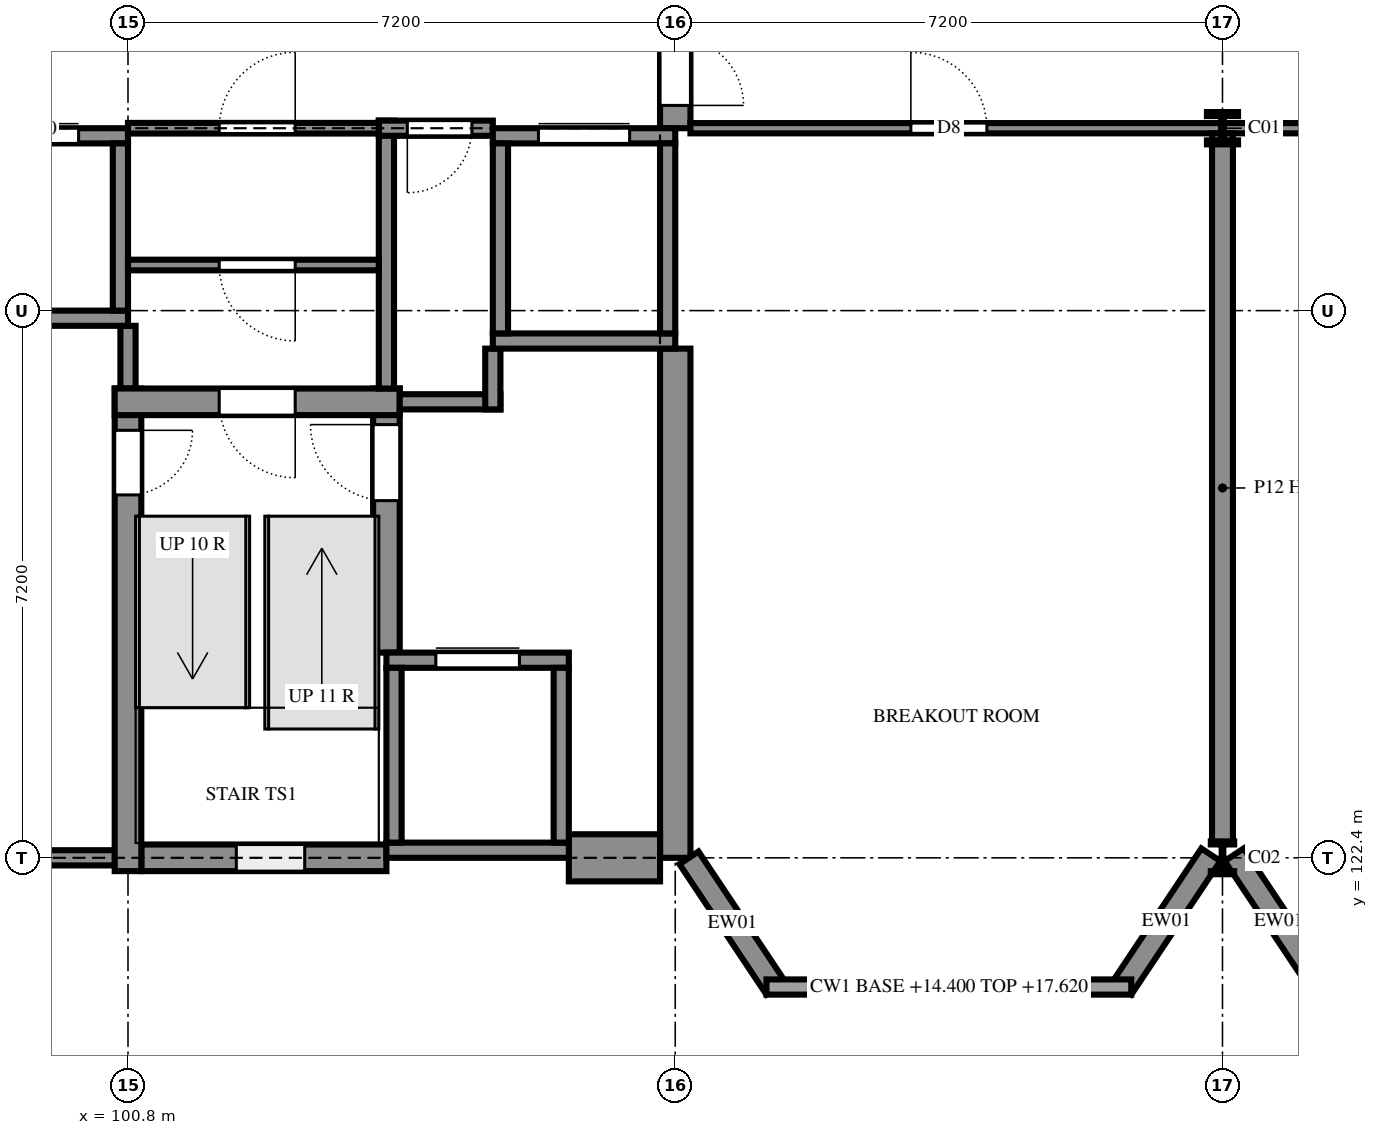
"""IFC4 building model, lengths in metres.
Left out: names, types, materials, properties, quantities, classifications, styles, units other than length and angle.
Written with IfcOpenShell. Run it as: python <this file> out.ifc"""

import sys

from ifc_helpers import new_model, si_unit, direction, frame, frame_2d, origin, origin_2d, place, context, subcontext, project, spatial, rectangle, i_section, extrude, element, fill, save


model = new_model("IFC4")
c1 = context("Model", 3, precision=1e-05, world=origin(), true_north=direction((0.0, 1.0)))
c2 = subcontext(c1, "Body", "Model", "MODEL_VIEW")
j1 = project(units=[si_unit("LENGTHUNIT", "METRE"), si_unit("PLANEANGLEUNIT", "RADIAN")], contexts=[c1])
p1 = place(None, origin())
s1 = spatial("IfcSite", under=j1, at=p1, CompositionType="ELEMENT")
p2 = place(p1, origin())
s2 = spatial("IfcBuilding", under=s1, at=p2, CompositionType="ELEMENT")
p3 = place(p2, frame((0.0, 0.0, 14.4)))
s3 = spatial("IfcBuildingStorey", under=s2, at=p3, CompositionType="ELEMENT", Elevation=14.4)
p4 = place(p3, frame((115.2, 122.4, 0.0), z_axis=(0.0, 0.0, 1.0), x_axis=(1.0, 0.0, 0.0)))
e1 = element("IfcColumn", 1, at=p4, inside=s3, PredefinedType="COLUMN", context=c2, shape_type="SweptSolid", body=[
    extrude(i_section(OverallWidth=0.307, OverallDepth=0.432, WebThickness=0.021, FlangeThickness=0.04, FilletRadius=0.027, at=origin_2d()), origin(), (0.0, 0.0, 1.0), 3.6),
])
p5 = place(p3, frame((115.2, 132.0, 0.0), z_axis=(0.0, 0.0, 1.0), x_axis=(1.0, 0.0, 0.0)))
e2 = element("IfcColumn", 2, at=p5, inside=s3, PredefinedType="COLUMN", context=c2, shape_type="SweptSolid", body=[
    extrude(i_section(OverallWidth=0.409, OverallDepth=0.425, WebThickness=0.033, FlangeThickness=0.052, FilletRadius=0.015, at=origin_2d()), origin(), (0.0, 0.0, 1.0), 3.6),
])
p6 = place(p3, frame((93.4, 122.4, 0.0), z_axis=(0.0, 0.0, 1.0), x_axis=(1.0, 0.0, 0.0)))
e3 = element("IfcWall", 3, at=p6, inside=s3, PredefinedType="SHEAR", context=c2, shape_type="SweptSolid", body=[
    extrude(rectangle(XDim=7.575, YDim=0.2, at=frame_2d((3.788, 0.0))), origin(), (0.0, 0.0, 1.0), 3.6),
])
p7 = place(p3, frame((100.975, 122.4, 0.0), z_axis=(0.0, 0.0, 1.0), x_axis=(1.0, 0.0, 0.0)))
e4 = element("IfcWall", 4, at=p7, inside=s3, PredefinedType="SHEAR", context=c2, shape_type="SweptSolid", body=[
    extrude(rectangle(XDim=3.225, YDim=0.35, at=frame_2d((1.612, 0.0))), origin(), (0.0, 0.0, 1.0), 3.6),
])
p8 = place(p7, frame((1.25, 0.0, 0.6)))
e5 = element("IfcOpeningElement", 5, at=p8, cuts=e4, PredefinedType="OPENING", context=c2, shape_type="SweptSolid", body=[
    extrude(rectangle(XDim=0.9, YDim=2.1, at=frame_2d((0.45, 1.05))), frame((0.0, 0.185, 0.0), z_axis=(0.0, -1.0, 0.0), x_axis=(1.0, 0.0, 0.0)), (0.0, 0.0, 1.0), 0.37),
])
p9 = place(p3, frame((108.0, 122.4, 0.0), z_axis=(0.0, 0.0, 1.0), x_axis=(0.0, 1.0, 0.0)))
e6 = element("IfcWall", 6, at=p9, inside=s3, PredefinedType="SHEAR", context=c2, shape_type="SweptSolid", body=[
    extrude(rectangle(XDim=6.7, YDim=0.4, at=frame_2d((3.35, 0.0))), origin(), (0.0, 0.0, 1.0), 3.6),
])
p10 = place(p3, frame((104.2, 125.1, 0.0), z_axis=(0.0, 0.0, 1.0), x_axis=(0.0, 1.0, 0.0)))
e7 = element("IfcWall", 7, at=p10, inside=s3, PredefinedType="SHEAR", context=c2, shape_type="SweptSolid", body=[
    extrude(rectangle(XDim=3.475, YDim=0.35, at=frame_2d((1.737, 0.0))), origin(), (0.0, 0.0, 1.0), 3.6),
])
p11 = place(p10, frame((2.0, 0.0, 0.0)))
e8 = element("IfcOpeningElement", 8, at=p11, cuts=e7, PredefinedType="OPENING", context=c2, shape_type="SweptSolid", body=[
    extrude(rectangle(XDim=1.0, YDim=2.1, at=frame_2d((0.5, 1.05))), frame((0.0, 0.185, 0.0), z_axis=(0.0, -1.0, 0.0), x_axis=(1.0, 0.0, 0.0)), (0.0, 0.0, 1.0), 0.37),
])
p12 = place(p3, frame((100.8, 128.575, 0.0), z_axis=(0.0, 0.0, 1.0), x_axis=(0.0, -1.0, 0.0)))
e9 = element("IfcWall", 9, at=p12, inside=s3, PredefinedType="SHEAR", context=c2, shape_type="SweptSolid", body=[
    extrude(rectangle(XDim=6.35, YDim=0.35, at=frame_2d((3.175, 0.0))), origin(), (0.0, 0.0, 1.0), 3.6),
])
p13 = place(p12, frame((0.55, 0.0, 0.0)))
e10 = element("IfcOpeningElement", 10, at=p13, cuts=e9, PredefinedType="OPENING", context=c2, shape_type="SweptSolid", body=[
    extrude(rectangle(XDim=0.85, YDim=2.1, at=frame_2d((0.425, 1.05))), frame((0.0, 0.185, 0.0), z_axis=(0.0, -1.0, 0.0), x_axis=(1.0, 0.0, 0.0)), (0.0, 0.0, 1.0), 0.37),
])
p14 = place(p3, frame((100.8, 128.575, 0.0), z_axis=(0.0, 0.0, 1.0), x_axis=(0.0, 1.0, 0.0)))
e11 = element("IfcWall", 11, at=p14, inside=s3, PredefinedType="SHEAR", context=c2, shape_type="SweptSolid", body=[
    extrude(rectangle(XDim=0.825, YDim=0.2, at=frame_2d((0.413, 0.0))), origin(), (0.0, 0.0, 1.0), 3.6),
])
p15 = place(p3, frame((104.375, 128.4, 0.0), z_axis=(0.0, 0.0, 1.0), x_axis=(-1.0, 0.0, 0.0)))
e12 = element("IfcWall", 12, at=p15, inside=s3, PredefinedType="SHEAR", context=c2, shape_type="SweptSolid", body=[
    extrude(rectangle(XDim=3.75, YDim=0.35, at=frame_2d((1.875, 0.0))), origin(), (0.0, 0.0, 1.0), 3.6),
])
p16 = place(p15, frame((1.375, 0.0, 0.0)))
e13 = element("IfcOpeningElement", 13, at=p16, cuts=e12, PredefinedType="OPENING", context=c2, shape_type="SweptSolid", body=[
    extrude(rectangle(XDim=1.0, YDim=2.1, at=frame_2d((0.5, 1.05))), frame((0.0, 0.185, 0.0), z_axis=(0.0, -1.0, 0.0), x_axis=(1.0, 0.0, 0.0)), (0.0, 0.0, 1.0), 0.37),
])
p17 = place(p3, frame((104.375, 128.4, 0.0), z_axis=(0.0, 0.0, 1.0), x_axis=(1.0, 0.0, 0.0)))
e14 = element("IfcWall", 14, at=p17, inside=s3, PredefinedType="SHEAR", context=c2, shape_type="SweptSolid", body=[
    extrude(rectangle(XDim=1.325, YDim=0.2, at=frame_2d((0.663, 0.0))), origin(), (0.0, 0.0, 1.0), 3.6),
])
p18 = place(p3, frame((105.6, 128.3, 0.0), z_axis=(0.0, 0.0, 1.0), x_axis=(0.0, 1.0, 0.0)))
e15 = element("IfcWall", 15, at=p18, inside=s3, PredefinedType="SHEAR", context=c2, shape_type="SweptSolid", body=[
    extrude(rectangle(XDim=0.8, YDim=0.2, at=frame_2d((0.4, 0.0))), origin(), (0.0, 0.0, 1.0), 3.6),
])
p19 = place(p3, frame((104.2, 132.1, 0.0), z_axis=(0.0, 0.0, 1.0), x_axis=(0.0, -1.0, 0.0)))
e16 = element("IfcWall", 16, at=p19, inside=s3, PredefinedType="SHEAR", context=c2, shape_type="SweptSolid", body=[
    extrude(rectangle(XDim=3.525, YDim=0.2, at=frame_2d((1.763, 0.0))), origin(), (0.0, 0.0, 1.0), 3.6),
])
p20 = place(p3, frame((105.6, 132.0, 0.0), z_axis=(0.0, 0.0, 1.0), x_axis=(-1.0, 0.0, 0.0)))
e17 = element("IfcWall", 17, at=p20, inside=s3, PredefinedType="SHEAR", context=c2, shape_type="SweptSolid", body=[
    extrude(rectangle(XDim=1.5, YDim=0.2, at=frame_2d((0.75, 0.0))), origin(), (0.0, 0.0, 1.0), 3.6),
])
p21 = place(p20, frame((0.275, 0.0, 0.0)))
e18 = element("IfcOpeningElement", 18, at=p21, cuts=e17, PredefinedType="OPENING", context=c2, shape_type="SweptSolid", body=[
    extrude(rectangle(XDim=0.85, YDim=2.1, at=frame_2d((0.425, 1.05))), frame((0.0, 0.11, 0.0), z_axis=(0.0, -1.0, 0.0), x_axis=(1.0, 0.0, 0.0)), (0.0, 0.0, 1.0), 0.22),
])
p22 = place(p3, frame((108.0, 132.0, 0.0), z_axis=(0.0, 0.0, 1.0), x_axis=(0.0, 1.0, 0.0)))
e19 = element("IfcWall", 19, at=p22, inside=s3, PredefinedType="SHEAR", context=c2, shape_type="SweptSolid", body=[
    extrude(rectangle(XDim=2.5, YDim=0.4, at=frame_2d((1.25, 0.0))), origin(), (0.0, 0.0, 1.0), 3.6),
])
p23 = place(p22, frame((0.3, 0.0, 0.0)))
e20 = element("IfcOpeningElement", 20, at=p23, cuts=e19, PredefinedType="OPENING", context=c2, shape_type="SweptSolid", body=[
    extrude(rectangle(XDim=1.8, YDim=2.1, at=frame_2d((0.9, 1.05))), frame((0.0, 0.21, 0.0), z_axis=(0.0, -1.0, 0.0), x_axis=(1.0, 0.0, 0.0)), (0.0, 0.0, 1.0), 0.42),
])
p24 = place(p3, frame((106.6, 122.4, 0.0), z_axis=(0.0, 0.0, 1.0), x_axis=(1.0, 0.0, 0.0)))
e21 = element("IfcWall", 21, at=p24, inside=s3, PredefinedType="SOLIDWALL", context=c2, shape_type="SweptSolid", body=[
    extrude(rectangle(XDim=1.2, YDim=0.62, at=frame_2d((0.6, 0.0))), origin(), (0.0, 0.0, 1.0), 3.46),
])
p25 = place(p3, frame((108.18, 122.4, 0.0), z_axis=(0.0, 0.0, 1.0), x_axis=(0.554618271946, -0.832104904699, 0.0)))
e22 = element("IfcWall", 22, at=p25, inside=s3, PredefinedType="SOLIDWALL", context=c2, shape_type="SweptSolid", body=[
    extrude(rectangle(XDim=2.063, YDim=0.3, at=frame_2d((1.032, 0.0))), origin(), (0.0, 0.0, 1.0), 3.22),
])
p26 = place(p3, frame((115.046, 122.44, 0.0), z_axis=(0.0, 0.0, 1.0), x_axis=(-0.554620150341, -0.8321036527, 0.0)))
e23 = element("IfcWall", 23, at=p26, inside=s3, PredefinedType="SOLIDWALL", context=c2, shape_type="SweptSolid", body=[
    extrude(rectangle(XDim=2.112, YDim=0.3, at=frame_2d((1.056, 0.0))), origin(), (0.0, 0.0, 1.0), 3.22),
])
p27 = place(p3, frame((115.354, 122.44, 0.0), z_axis=(0.0, 0.0, 1.0), x_axis=(0.554700196225, -0.832050294338, 0.0)))
e24 = element("IfcWall", 24, at=p27, inside=s3, PredefinedType="SOLIDWALL", context=c2, shape_type="SweptSolid", body=[
    extrude(rectangle(XDim=2.112, YDim=0.3, at=frame_2d((1.056, 0.0))), origin(), (0.0, 0.0, 1.0), 3.22),
])
p28 = place(p3, frame((98.4, 129.5, 0.0), z_axis=(0.0, 0.0, 1.0), x_axis=(1.0, 0.0, 0.0)))
e25 = element("IfcWall", 25, at=p28, inside=s3, PredefinedType="SHEAR", context=c2, shape_type="SweptSolid", body=[
    extrude(rectangle(XDim=2.4, YDim=0.2, at=frame_2d((1.2, 0.0))), origin(), (0.0, 0.0, 1.0), 3.6),
])
p29 = place(p3, frame((98.4, 131.9, 0.0), z_axis=(0.0, 0.0, 1.0), x_axis=(1.0, 0.0, 0.0)))
e26 = element("IfcWall", 26, at=p29, inside=s3, PredefinedType="SHEAR", context=c2, shape_type="SweptSolid", body=[
    extrude(rectangle(XDim=2.4, YDim=0.2, at=frame_2d((1.2, 0.0))), origin(), (0.0, 0.0, 1.0), 3.6),
])
p30 = place(p29, frame((0.65, 0.0, 0.0)))
e27 = element("IfcOpeningElement", 27, at=p30, cuts=e26, PredefinedType="OPENING", context=c2, shape_type="SweptSolid", body=[
    extrude(rectangle(XDim=1.1, YDim=2.1, at=frame_2d((0.55, 1.05))), frame((0.0, 0.11, 0.0), z_axis=(0.0, -1.0, 0.0), x_axis=(1.0, 0.0, 0.0)), (0.0, 0.0, 1.0), 0.22),
])
p31 = place(p3, frame((100.7, 129.6, 0.0), z_axis=(0.0, 0.0, 1.0), x_axis=(0.0, 1.0, 0.0)))
e28 = element("IfcWall", 28, at=p31, inside=s3, PredefinedType="SHEAR", context=c2, shape_type="SweptSolid", body=[
    extrude(rectangle(XDim=2.2, YDim=0.2, at=frame_2d((1.1, 0.0))), origin(), (0.0, 0.0, 1.0), 3.6),
])
p32 = place(p3, frame((104.2, 122.5, 0.0), z_axis=(0.0, 0.0, 1.0), x_axis=(1.0, 0.0, 0.0)))
e29 = element("IfcWall", 29, at=p32, inside=s3, PredefinedType="SHEAR", context=c2, shape_type="SweptSolid", body=[
    extrude(rectangle(XDim=2.4, YDim=0.2, at=frame_2d((1.2, 0.0))), origin(), (0.0, 0.0, 1.0), 3.6),
])
p33 = place(p3, frame((104.2, 125.0, 0.0), z_axis=(0.0, 0.0, 1.0), x_axis=(1.0, 0.0, 0.0)))
e30 = element("IfcWall", 30, at=p33, inside=s3, PredefinedType="SHEAR", context=c2, shape_type="SweptSolid", body=[
    extrude(rectangle(XDim=2.4, YDim=0.2, at=frame_2d((1.2, 0.0))), origin(), (0.0, 0.0, 1.0), 3.6),
])
p34 = place(p33, frame((0.65, 0.0, 0.0)))
e31 = element("IfcOpeningElement", 31, at=p34, cuts=e30, PredefinedType="OPENING", context=c2, shape_type="SweptSolid", body=[
    extrude(rectangle(XDim=1.1, YDim=2.1, at=frame_2d((0.55, 1.05))), frame((0.0, 0.11, 0.0), z_axis=(0.0, -1.0, 0.0), x_axis=(1.0, 0.0, 0.0)), (0.0, 0.0, 1.0), 0.22),
])
for number, where, z_axis, x_axis in (
    (32, (104.3, 122.6, 0.0), (0.0, 0.0, 1.0), (0.0, 1.0, 0.0)),
    (33, (106.5, 122.6, 0.0), (0.0, 0.0, 1.0), (0.0, 1.0, 0.0)),
):
    element("IfcWall", number, at=place(p3, frame(where, z_axis=z_axis, x_axis=x_axis)), inside=s3, PredefinedType="SHEAR", context=c2, shape_type="SweptSolid", body=[
        extrude(rectangle(XDim=2.3, YDim=0.2, at=frame_2d((1.15, 0.0))), origin(), (0.0, 0.0, 1.0), 3.6),
    ])
p35 = place(p3, frame((105.6, 129.2, 0.0), z_axis=(0.0, 0.0, 1.0), x_axis=(1.0, 0.0, 0.0)))
e34 = element("IfcWall", 34, at=p35, inside=s3, PredefinedType="SHEAR", context=c2, shape_type="SweptSolid", body=[
    extrude(rectangle(XDim=2.4, YDim=0.2, at=frame_2d((1.2, 0.0))), origin(), (0.0, 0.0, 1.0), 3.6),
])
p36 = place(p3, frame((105.6, 131.9, 0.0), z_axis=(0.0, 0.0, 1.0), x_axis=(1.0, 0.0, 0.0)))
e35 = element("IfcWall", 35, at=p36, inside=s3, PredefinedType="SHEAR", context=c2, shape_type="SweptSolid", body=[
    extrude(rectangle(XDim=2.4, YDim=0.2, at=frame_2d((1.2, 0.0))), origin(), (0.0, 0.0, 1.0), 3.6),
])
p37 = place(p36, frame((0.6, 0.0, 0.0)))
e36 = element("IfcOpeningElement", 36, at=p37, cuts=e35, PredefinedType="OPENING", context=c2, shape_type="SweptSolid", body=[
    extrude(rectangle(XDim=1.2, YDim=2.1, at=frame_2d((0.6, 1.05))), frame((0.0, 0.11, 0.0), z_axis=(0.0, -1.0, 0.0), x_axis=(1.0, 0.0, 0.0)), (0.0, 0.0, 1.0), 0.22),
])
for number, where, z_axis, x_axis in (
    (37, (105.7, 129.3, 0.0), (0.0, 0.0, 1.0), (0.0, 1.0, 0.0)),
    (38, (107.9, 129.3, 0.0), (0.0, 0.0, 1.0), (0.0, 1.0, 0.0)),
):
    element("IfcWall", number, at=place(p3, frame(where, z_axis=z_axis, x_axis=x_axis)), inside=s3, PredefinedType="SHEAR", context=c2, shape_type="SweptSolid", body=[
        extrude(rectangle(XDim=2.5, YDim=0.2, at=frame_2d((1.25, 0.0))), origin(), (0.0, 0.0, 1.0), 3.6),
    ])
p38 = place(p3, frame((100.8, 130.2, 0.0), z_axis=(0.0, 0.0, 1.0), x_axis=(1.0, 0.0, 0.0)))
e39 = element("IfcWall", 39, at=p38, inside=s3, PredefinedType="PARTITIONING", context=c2, shape_type="SweptSolid", body=[
    extrude(rectangle(XDim=3.3, YDim=0.14, at=frame_2d((1.65, 0.0))), origin(), (0.0, 0.0, 1.0), 3.42),
])
p39 = place(p38, frame((1.2, 0.0, 0.0)))
e40 = element("IfcOpeningElement", 40, at=p39, cuts=e39, PredefinedType="OPENING", context=c2, shape_type="SweptSolid", body=[
    extrude(rectangle(XDim=1.0, YDim=2.1, at=frame_2d((0.5, 1.05))), frame((0.0, 0.08, 0.0), z_axis=(0.0, -1.0, 0.0), x_axis=(1.0, 0.0, 0.0)), (0.0, 0.0, 1.0), 0.16),
])
p40 = place(p3, frame((100.8, 132.0, 0.0), z_axis=(0.0, 0.0, 1.0), x_axis=(1.0, 0.0, 0.0)))
e41 = element("IfcWall", 41, at=p40, inside=s3, PredefinedType="PARTITIONING", context=c2, shape_type="SweptSolid", body=[
    extrude(rectangle(XDim=3.3, YDim=0.14, at=frame_2d((1.65, 0.0))), origin(), (0.0, 0.0, 1.0), 3.42),
])
p41 = place(p40, frame((1.2, 0.0, 0.0)))
e42 = element("IfcOpeningElement", 42, at=p41, cuts=e41, PredefinedType="OPENING", context=c2, shape_type="SweptSolid", body=[
    extrude(rectangle(XDim=1.0, YDim=2.1, at=frame_2d((0.5, 1.05))), frame((0.0, 0.08, 0.0), z_axis=(0.0, -1.0, 0.0), x_axis=(1.0, 0.0, 0.0)), (0.0, 0.0, 1.0), 0.16),
])
p42 = place(p3, frame((108.2, 132.0, 0.0), z_axis=(0.0, 0.0, 1.0), x_axis=(1.0, 0.0, 0.0)))
e43 = element("IfcWall", 43, at=p42, inside=s3, PredefinedType="PARTITIONING", context=c2, shape_type="SweptSolid", body=[
    extrude(rectangle(XDim=19.258, YDim=0.135, at=frame_2d((9.629, 0.0))), origin(), (0.0, 0.0, 1.0), 3.16),
])
p43 = place(p42, frame((2.9, 0.0, 0.0)))
e44 = element("IfcOpeningElement", 44, at=p43, cuts=e43, PredefinedType="OPENING", context=c2, shape_type="SweptSolid", body=[
    extrude(rectangle(XDim=1.0, YDim=2.4, at=frame_2d((0.5, 1.2))), frame((0.0, 0.077, 0.0), z_axis=(0.0, -1.0, 0.0), x_axis=(1.0, 0.0, 0.0)), (0.0, 0.0, 1.0), 0.155),
])
p44 = place(p42, frame((10.1, 0.0, 0.0)))
e45 = element("IfcOpeningElement", 45, at=p44, cuts=e43, PredefinedType="OPENING", context=c2, shape_type="SweptSolid", body=[
    extrude(rectangle(XDim=1.0, YDim=2.4, at=frame_2d((0.5, 1.2))), frame((0.0, 0.077, 0.0), z_axis=(0.0, -1.0, 0.0), x_axis=(1.0, 0.0, 0.0)), (0.0, 0.0, 1.0), 0.155),
])
p45 = place(p42, frame((18.1, 0.0, 0.0)))
e46 = element("IfcOpeningElement", 46, at=p45, cuts=e43, PredefinedType="OPENING", context=c2, shape_type="SweptSolid", body=[
    extrude(rectangle(XDim=1.0, YDim=2.4, at=frame_2d((0.5, 1.2))), frame((0.0, 0.077, 0.0), z_axis=(0.0, -1.0, 0.0), x_axis=(1.0, 0.0, 0.0)), (0.0, 0.0, 1.0), 0.155),
])
p46 = place(p3, frame((115.2, 122.6, 0.0), z_axis=(0.0, 0.0, 1.0), x_axis=(0.0, 1.0, 0.0)))
e47 = element("IfcWall", 47, at=p46, inside=s3, PredefinedType="PARTITIONING", context=c2, shape_type="SweptSolid", body=[
    extrude(rectangle(XDim=9.333, YDim=0.275, at=frame_2d((4.666, 0.0))), origin(), (0.0, 0.0, 1.0), 3.06),
])
p47 = place(p8, origin())
e48 = element("IfcWindow", 48, at=p47, inside=s3, PartitioningType="SINGLE_PANEL", PredefinedType="WINDOW", context=c2, shape_type="SweptSolid", body=[
    extrude(rectangle(XDim=0.9, YDim=2.1, at=frame_2d((0.45, 1.05))), frame((0.0, 0.03, 0.0), z_axis=(0.0, -1.0, 0.0), x_axis=(1.0, 0.0, 0.0)), (0.0, 0.0, 1.0), 0.06),
])
fill(e5, e48)
p48 = place(p30, origin())
e49 = element("IfcDoor", 49, at=p48, inside=s3, OperationType="SLIDING_TO_LEFT", PredefinedType="DOOR", context=c2, shape_type="SweptSolid", body=[
    extrude(rectangle(XDim=1.1, YDim=2.1, at=frame_2d((0.55, 1.05))), frame((0.0, 0.025, 0.0), z_axis=(0.0, -1.0, 0.0), x_axis=(1.0, 0.0, 0.0)), (0.0, 0.0, 1.0), 0.05),
])
fill(e27, e49)
p49 = place(p34, origin())
e50 = element("IfcDoor", 50, at=p49, inside=s3, OperationType="SLIDING_TO_LEFT", PredefinedType="DOOR", context=c2, shape_type="SweptSolid", body=[
    extrude(rectangle(XDim=1.1, YDim=2.1, at=frame_2d((0.55, 1.05))), frame((0.0, 0.025, 0.0), z_axis=(0.0, -1.0, 0.0), x_axis=(1.0, 0.0, 0.0)), (0.0, 0.0, 1.0), 0.05),
])
fill(e31, e50)
p50 = place(p37, origin())
e51 = element("IfcDoor", 51, at=p50, inside=s3, OperationType="SLIDING_TO_LEFT", PredefinedType="DOOR", context=c2, shape_type="SweptSolid", body=[
    extrude(rectangle(XDim=1.2, YDim=2.1, at=frame_2d((0.6, 1.05))), frame((0.0, 0.025, 0.0), z_axis=(0.0, -1.0, 0.0), x_axis=(1.0, 0.0, 0.0)), (0.0, 0.0, 1.0), 0.05),
])
fill(e36, e51)
p51 = place(p39, frame((1.0, 0.0, 0.0), z_axis=(0.0, 0.0, 1.0), x_axis=(-1.0, 0.0, 0.0)))
e52 = element("IfcDoor", 52, at=p51, inside=s3, OperationType="SINGLE_SWING_RIGHT", PredefinedType="DOOR", context=c2, shape_type="SweptSolid", body=[
    extrude(rectangle(XDim=1.0, YDim=2.1, at=frame_2d((0.5, 1.05))), frame((0.0, 0.025, 0.0), z_axis=(0.0, -1.0, 0.0), x_axis=(1.0, 0.0, 0.0)), (0.0, 0.0, 1.0), 0.05),
])
fill(e40, e52)
p52 = place(p41, origin())
e53 = element("IfcDoor", 53, at=p52, inside=s3, OperationType="SINGLE_SWING_LEFT", PredefinedType="DOOR", context=c2, shape_type="SweptSolid", body=[
    extrude(rectangle(XDim=1.0, YDim=2.1, at=frame_2d((0.5, 1.05))), frame((0.0, 0.025, 0.0), z_axis=(0.0, -1.0, 0.0), x_axis=(1.0, 0.0, 0.0)), (0.0, 0.0, 1.0), 0.05),
])
fill(e42, e53)
p53 = place(p43, origin())
e54 = element("IfcDoor", 54, at=p53, inside=s3, OperationType="SINGLE_SWING_RIGHT", PredefinedType="DOOR", context=c2, shape_type="SweptSolid", body=[
    extrude(rectangle(XDim=1.0, YDim=2.4, at=frame_2d((0.5, 1.2))), frame((0.0, 0.025, 0.0), z_axis=(0.0, -1.0, 0.0), x_axis=(1.0, 0.0, 0.0)), (0.0, 0.0, 1.0), 0.05),
])
fill(e44, e54)
p54 = place(p16, origin())
e55 = element("IfcDoor", 55, at=p54, inside=s3, OperationType="SINGLE_SWING_RIGHT", PredefinedType="DOOR", context=c2, shape_type="SweptSolid", body=[
    extrude(rectangle(XDim=1.0, YDim=2.1, at=frame_2d((0.5, 1.05))), frame((0.0, 0.025, 0.0), z_axis=(0.0, -1.0, 0.0), x_axis=(1.0, 0.0, 0.0)), (0.0, 0.0, 1.0), 0.05),
])
fill(e13, e55)
p55 = place(p13, origin())
e56 = element("IfcDoor", 56, at=p55, inside=s3, OperationType="SINGLE_SWING_RIGHT", PredefinedType="DOOR", context=c2, shape_type="SweptSolid", body=[
    extrude(rectangle(XDim=0.85, YDim=2.1, at=frame_2d((0.425, 1.05))), frame((0.0, 0.025, 0.0), z_axis=(0.0, -1.0, 0.0), x_axis=(1.0, 0.0, 0.0)), (0.0, 0.0, 1.0), 0.05),
])
fill(e10, e56)
p56 = place(p11, origin())
e57 = element("IfcDoor", 57, at=p56, inside=s3, OperationType="SINGLE_SWING_LEFT", PredefinedType="DOOR", context=c2, shape_type="SweptSolid", body=[
    extrude(rectangle(XDim=1.0, YDim=2.1, at=frame_2d((0.5, 1.05))), frame((0.0, 0.025, 0.0), z_axis=(0.0, -1.0, 0.0), x_axis=(1.0, 0.0, 0.0)), (0.0, 0.0, 1.0), 0.05),
])
fill(e8, e57)
p57 = place(p21, origin())
e58 = element("IfcDoor", 58, at=p57, inside=s3, OperationType="SINGLE_SWING_LEFT", PredefinedType="DOOR", context=c2, shape_type="SweptSolid", body=[
    extrude(rectangle(XDim=0.85, YDim=2.1, at=frame_2d((0.425, 1.05))), frame((0.0, 0.025, 0.0), z_axis=(0.0, -1.0, 0.0), x_axis=(1.0, 0.0, 0.0)), (0.0, 0.0, 1.0), 0.05),
])
fill(e18, e58)
p58 = place(p23, frame((1.8, 0.0, 0.0), z_axis=(0.0, 0.0, 1.0), x_axis=(-1.0, 0.0, 0.0)))
e59 = element("IfcDoor", 59, at=p58, inside=s3, OperationType="DOUBLE_DOOR_SINGLE_SWING", PredefinedType="DOOR", context=c2, shape_type="SweptSolid", body=[
    extrude(rectangle(XDim=1.8, YDim=2.1, at=frame_2d((0.9, 1.05))), frame((0.0, 0.025, 0.0), z_axis=(0.0, -1.0, 0.0), x_axis=(1.0, 0.0, 0.0)), (0.0, 0.0, 1.0), 0.05),
])
fill(e20, e59)
save(model, sys.argv[1])
